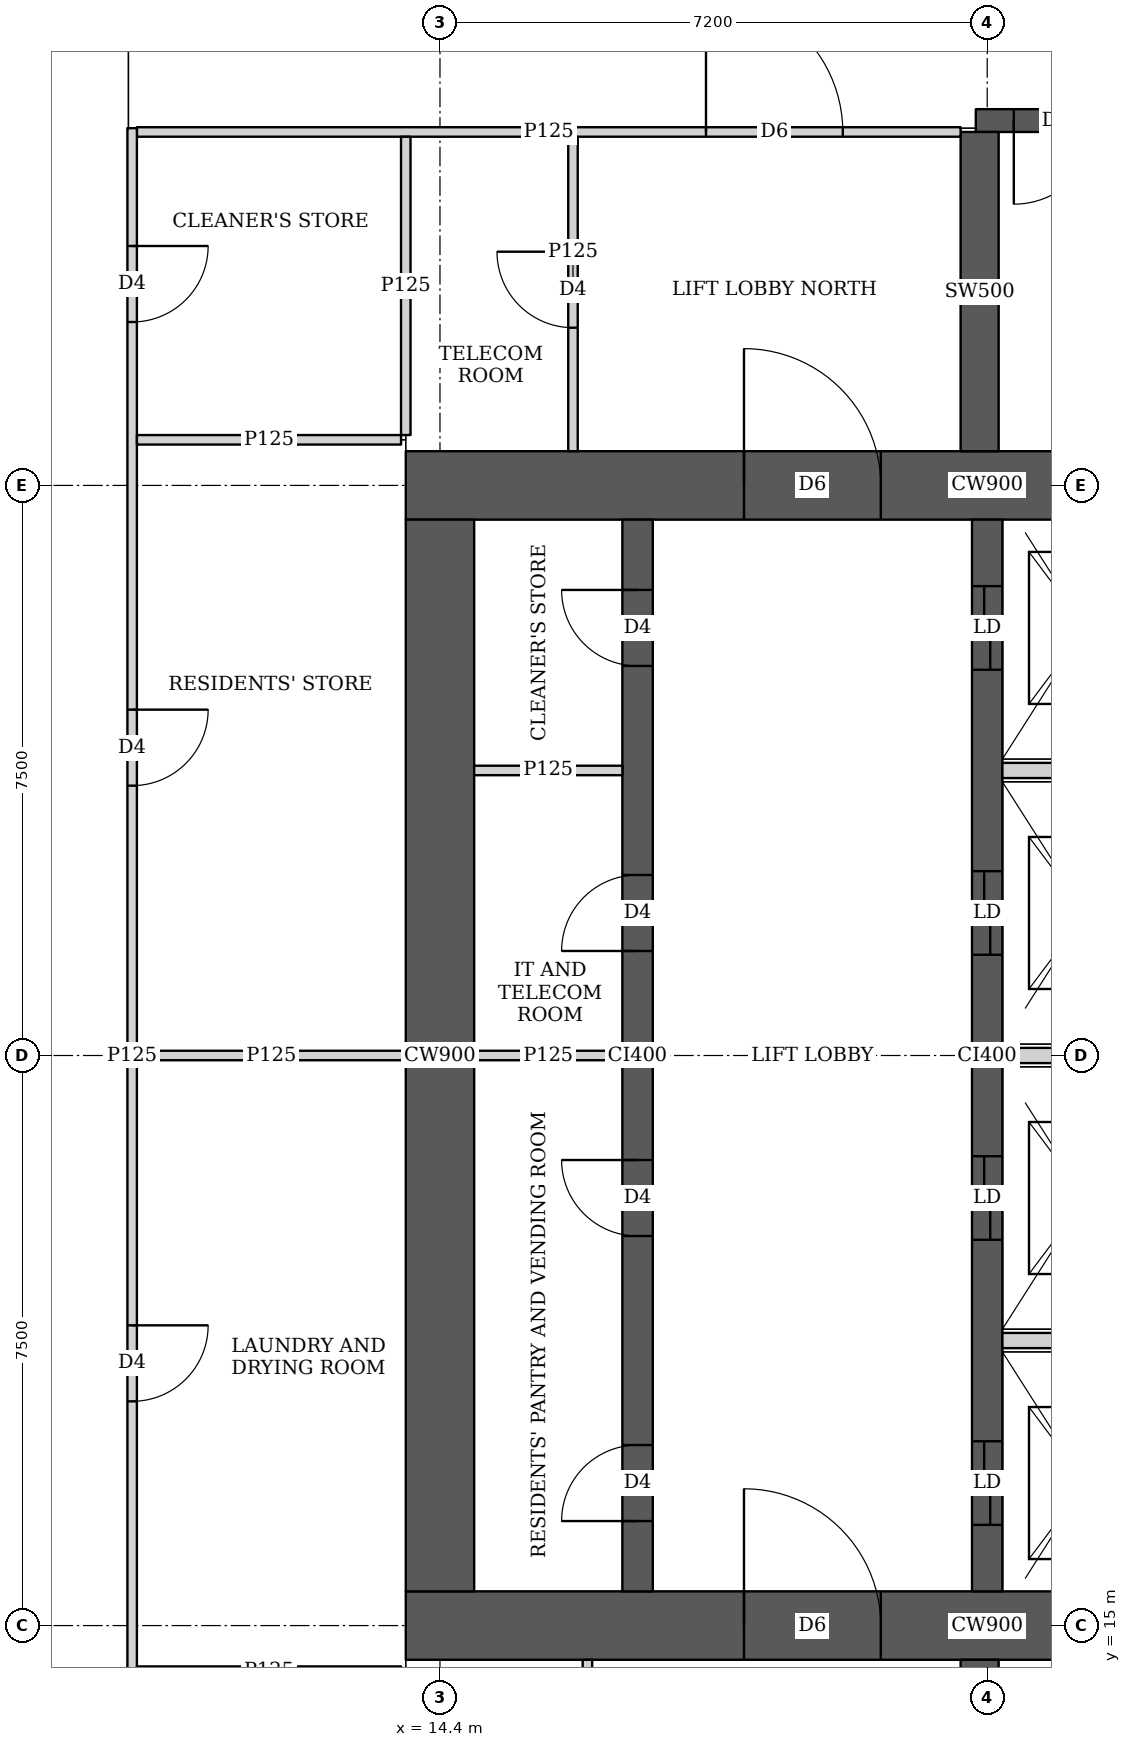
"""IFC4 building model, lengths in metres.
Left out: names, types, materials, properties, quantities, classifications, styles, units other than length and angle.
Written with IfcOpenShell. Run it as: python <this file> out.ifc"""

import sys

from ifc_helpers import new_model, si_unit, direction, frame, frame_2d, origin, place, context, subcontext, project, spatial, rectangle, extrude, element, fill, save


model = new_model("IFC4")
c1 = context("Model", 3, precision=1e-05, world=origin(), true_north=direction((0.0, 1.0)))
c2 = subcontext(c1, "Body", "Model", "MODEL_VIEW")
j1 = project(units=[si_unit("LENGTHUNIT", "METRE"), si_unit("PLANEANGLEUNIT", "RADIAN")], contexts=[c1])
p1 = place(None, origin())
s1 = spatial("IfcSite", under=j1, at=p1, CompositionType="ELEMENT")
p2 = place(p1, origin())
s2 = spatial("IfcBuilding", under=s1, at=p2, CompositionType="ELEMENT")
p3 = place(p2, frame((0.0, 0.0, 180.8)))
s3 = spatial("IfcBuildingStorey", under=s2, at=p3, CompositionType="ELEMENT", Elevation=180.8)
p4 = place(p3, frame((13.95, 15.0, 0.0), z_axis=(0.0, 0.0, 1.0), x_axis=(1.0, 0.0, 0.0)))
e1 = element("IfcWall", 1, at=p4, inside=s3, PredefinedType="SHEAR", context=c2, shape_type="SweptSolid", body=[
    extrude(rectangle(XDim=15.3, YDim=0.9, at=frame_2d((7.65, 0.0))), origin(), (0.0, 0.0, 1.0), 3.75),
])
p5 = place(p4, frame((4.45, 0.0, 0.0)))
e2 = element("IfcOpeningElement", 2, at=p5, cuts=e1, PredefinedType="OPENING", context=c2, shape_type="SweptSolid", body=[
    extrude(rectangle(XDim=1.8, YDim=2.1, at=frame_2d((0.9, 1.05))), frame((0.0, 0.46, 0.0), z_axis=(0.0, -1.0, 0.0), x_axis=(1.0, 0.0, 0.0)), (0.0, 0.0, 1.0), 0.92),
])
p6 = place(p4, frame((10.7, 0.0, 0.0)))
e3 = element("IfcOpeningElement", 3, at=p6, cuts=e1, PredefinedType="OPENING", context=c2, shape_type="SweptSolid", body=[
    extrude(rectangle(XDim=1.1, YDim=2.1, at=frame_2d((0.55, 1.05))), frame((0.0, 0.46, 0.0), z_axis=(0.0, -1.0, 0.0), x_axis=(1.0, 0.0, 0.0)), (0.0, 0.0, 1.0), 0.92),
])
p7 = place(p3, frame((13.95, 30.0, 0.0), z_axis=(0.0, 0.0, 1.0), x_axis=(1.0, 0.0, 0.0)))
e4 = element("IfcWall", 4, at=p7, inside=s3, PredefinedType="SHEAR", context=c2, shape_type="SweptSolid", body=[
    extrude(rectangle(XDim=15.3, YDim=0.9, at=frame_2d((7.65, 0.0))), origin(), (0.0, 0.0, 1.0), 3.75),
])
p8 = place(p7, frame((4.45, 0.0, 0.0)))
e5 = element("IfcOpeningElement", 5, at=p8, cuts=e4, PredefinedType="OPENING", context=c2, shape_type="SweptSolid", body=[
    extrude(rectangle(XDim=1.8, YDim=2.1, at=frame_2d((0.9, 1.05))), frame((0.0, 0.46, 0.0), z_axis=(0.0, -1.0, 0.0), x_axis=(1.0, 0.0, 0.0)), (0.0, 0.0, 1.0), 0.92),
])
p9 = place(p7, frame((10.7, 0.0, 0.0)))
e6 = element("IfcOpeningElement", 6, at=p9, cuts=e4, PredefinedType="OPENING", context=c2, shape_type="SweptSolid", body=[
    extrude(rectangle(XDim=1.1, YDim=2.1, at=frame_2d((0.55, 1.05))), frame((0.0, 0.46, 0.0), z_axis=(0.0, -1.0, 0.0), x_axis=(1.0, 0.0, 0.0)), (0.0, 0.0, 1.0), 0.92),
])
p10 = place(p3, frame((14.4, 15.45, 0.0), z_axis=(0.0, 0.0, 1.0), x_axis=(0.0, 1.0, 0.0)))
e7 = element("IfcWall", 7, at=p10, inside=s3, PredefinedType="SHEAR", context=c2, shape_type="SweptSolid", body=[
    extrude(rectangle(XDim=14.1, YDim=0.9, at=frame_2d((7.05, 0.0))), origin(), (0.0, 0.0, 1.0), 3.75),
])
p11 = place(p3, frame((17.0, 15.45, 0.0), z_axis=(0.0, 0.0, 1.0), x_axis=(0.0, 1.0, 0.0)))
e8 = element("IfcWall", 8, at=p11, inside=s3, PredefinedType="SHEAR", context=c2, shape_type="SweptSolid", body=[
    extrude(rectangle(XDim=14.1, YDim=0.4, at=frame_2d((7.05, 0.0))), origin(), (0.0, 0.0, 1.0), 3.75),
])
p12 = place(p11, frame((0.925, 0.0, 0.0)))
e9 = element("IfcOpeningElement", 9, at=p12, cuts=e8, PredefinedType="OPENING", context=c2, shape_type="SweptSolid", body=[
    extrude(rectangle(XDim=1.0, YDim=2.1, at=frame_2d((0.5, 1.05))), frame((0.0, 0.21, 0.0), z_axis=(0.0, -1.0, 0.0), x_axis=(1.0, 0.0, 0.0)), (0.0, 0.0, 1.0), 0.42),
])
p13 = place(p11, frame((4.675, 0.0, 0.0)))
e10 = element("IfcOpeningElement", 10, at=p13, cuts=e8, PredefinedType="OPENING", context=c2, shape_type="SweptSolid", body=[
    extrude(rectangle(XDim=1.0, YDim=2.1, at=frame_2d((0.5, 1.05))), frame((0.0, 0.21, 0.0), z_axis=(0.0, -1.0, 0.0), x_axis=(1.0, 0.0, 0.0)), (0.0, 0.0, 1.0), 0.42),
])
p14 = place(p11, frame((8.425, 0.0, 0.0)))
e11 = element("IfcOpeningElement", 11, at=p14, cuts=e8, PredefinedType="OPENING", context=c2, shape_type="SweptSolid", body=[
    extrude(rectangle(XDim=1.0, YDim=2.1, at=frame_2d((0.5, 1.05))), frame((0.0, 0.21, 0.0), z_axis=(0.0, -1.0, 0.0), x_axis=(1.0, 0.0, 0.0)), (0.0, 0.0, 1.0), 0.42),
])
p15 = place(p11, frame((12.175, 0.0, 0.0)))
e12 = element("IfcOpeningElement", 12, at=p15, cuts=e8, PredefinedType="OPENING", context=c2, shape_type="SweptSolid", body=[
    extrude(rectangle(XDim=1.0, YDim=2.1, at=frame_2d((0.5, 1.05))), frame((0.0, 0.21, 0.0), z_axis=(0.0, -1.0, 0.0), x_axis=(1.0, 0.0, 0.0)), (0.0, 0.0, 1.0), 0.42),
])
p16 = place(p3, frame((21.6, 15.45, 0.0), z_axis=(0.0, 0.0, 1.0), x_axis=(0.0, 1.0, 0.0)))
e13 = element("IfcWall", 13, at=p16, inside=s3, PredefinedType="SHEAR", context=c2, shape_type="SweptSolid", body=[
    extrude(rectangle(XDim=14.1, YDim=0.4, at=frame_2d((7.05, 0.0))), origin(), (0.0, 0.0, 1.0), 3.75),
])
p17 = place(p16, frame((0.875, 0.0, 0.0)))
e14 = element("IfcOpeningElement", 14, at=p17, cuts=e13, PredefinedType="OPENING", context=c2, shape_type="SweptSolid", body=[
    extrude(rectangle(XDim=1.1, YDim=2.1, at=frame_2d((0.55, 1.05))), frame((0.0, 0.21, 0.0), z_axis=(0.0, -1.0, 0.0), x_axis=(1.0, 0.0, 0.0)), (0.0, 0.0, 1.0), 0.42),
])
p18 = place(p16, frame((4.625, 0.0, 0.0)))
e15 = element("IfcOpeningElement", 15, at=p18, cuts=e13, PredefinedType="OPENING", context=c2, shape_type="SweptSolid", body=[
    extrude(rectangle(XDim=1.1, YDim=2.1, at=frame_2d((0.55, 1.05))), frame((0.0, 0.21, 0.0), z_axis=(0.0, -1.0, 0.0), x_axis=(1.0, 0.0, 0.0)), (0.0, 0.0, 1.0), 0.42),
])
p19 = place(p16, frame((8.375, 0.0, 0.0)))
e16 = element("IfcOpeningElement", 16, at=p19, cuts=e13, PredefinedType="OPENING", context=c2, shape_type="SweptSolid", body=[
    extrude(rectangle(XDim=1.1, YDim=2.1, at=frame_2d((0.55, 1.05))), frame((0.0, 0.21, 0.0), z_axis=(0.0, -1.0, 0.0), x_axis=(1.0, 0.0, 0.0)), (0.0, 0.0, 1.0), 0.42),
])
p20 = place(p16, frame((12.125, 0.0, 0.0)))
e17 = element("IfcOpeningElement", 17, at=p20, cuts=e13, PredefinedType="OPENING", context=c2, shape_type="SweptSolid", body=[
    extrude(rectangle(XDim=1.1, YDim=2.1, at=frame_2d((0.55, 1.05))), frame((0.0, 0.21, 0.0), z_axis=(0.0, -1.0, 0.0), x_axis=(1.0, 0.0, 0.0)), (0.0, 0.0, 1.0), 0.42),
])
p21 = place(p3, frame((21.5, 10.35, 0.0), z_axis=(0.0, 0.0, 1.0), x_axis=(0.0, 1.0, 0.0)))
e18 = element("IfcWall", 18, at=p21, inside=s3, PredefinedType="SHEAR", context=c2, shape_type="SweptSolid", body=[
    extrude(rectangle(XDim=4.2, YDim=0.5, at=frame_2d((2.1, 0.0))), origin(), (0.0, 0.0, 1.0), 3.75),
])
p22 = place(p3, frame((21.45, 34.8, 0.0), z_axis=(0.0, 0.0, 1.0), x_axis=(1.0, 0.0, 0.0)))
e19 = element("IfcWall", 19, at=p22, inside=s3, PredefinedType="SHEAR", context=c2, shape_type="SweptSolid", body=[
    extrude(rectangle(XDim=7.5, YDim=0.3, at=frame_2d((3.75, 0.0))), origin(), (0.0, 0.0, 1.0), 3.75),
])
p23 = place(p22, frame((0.5, 0.0, 0.0)))
e20 = element("IfcOpeningElement", 20, at=p23, cuts=e19, PredefinedType="OPENING", context=c2, shape_type="SweptSolid", body=[
    extrude(rectangle(XDim=1.1, YDim=2.1, at=frame_2d((0.55, 1.05))), frame((0.0, 0.16, 0.0), z_axis=(0.0, -1.0, 0.0), x_axis=(1.0, 0.0, 0.0)), (0.0, 0.0, 1.0), 0.32),
])
p24 = place(p3, frame((21.5, 30.45, 0.0), z_axis=(0.0, 0.0, 1.0), x_axis=(0.0, 1.0, 0.0)))
e21 = element("IfcWall", 21, at=p24, inside=s3, PredefinedType="SHEAR", context=c2, shape_type="SweptSolid", body=[
    extrude(rectangle(XDim=4.2, YDim=0.5, at=frame_2d((2.1, 0.0))), origin(), (0.0, 0.0, 1.0), 3.75),
])
p25 = place(p3, frame((10.35, 10.3, 0.0), z_axis=(0.0, 0.0, 1.0), x_axis=(0.0, 1.0, 0.0)))
e22 = element("IfcWall", 22, at=p25, inside=s3, PredefinedType="PARTITIONING", context=c2, shape_type="SweptSolid", body=[
    extrude(rectangle(XDim=24.4, YDim=0.125, at=frame_2d((12.2, 0.0))), origin(), (0.0, 0.0, 1.0), 3.5),
])
p26 = place(p25, frame((1.55, 0.0, 0.0)))
e23 = element("IfcOpeningElement", 23, at=p26, cuts=e22, PredefinedType="OPENING", context=c2, shape_type="SweptSolid", body=[
    extrude(rectangle(XDim=1.0, YDim=2.1, at=frame_2d((0.5, 1.05))), frame((0.0, 0.073, 0.0), z_axis=(0.0, -1.0, 0.0), x_axis=(1.0, 0.0, 0.0)), (0.0, 0.0, 1.0), 0.145),
])
p27 = place(p25, frame((7.65, 0.0, 0.0)))
e24 = element("IfcOpeningElement", 24, at=p27, cuts=e22, PredefinedType="OPENING", context=c2, shape_type="SweptSolid", body=[
    extrude(rectangle(XDim=1.0, YDim=2.1, at=frame_2d((0.5, 1.05))), frame((0.0, 0.073, 0.0), z_axis=(0.0, -1.0, 0.0), x_axis=(1.0, 0.0, 0.0)), (0.0, 0.0, 1.0), 0.145),
])
p28 = place(p25, frame((15.75, 0.0, 0.0)))
e25 = element("IfcOpeningElement", 25, at=p28, cuts=e22, PredefinedType="OPENING", context=c2, shape_type="SweptSolid", body=[
    extrude(rectangle(XDim=1.0, YDim=2.1, at=frame_2d((0.5, 1.05))), frame((0.0, 0.073, 0.0), z_axis=(0.0, -1.0, 0.0), x_axis=(1.0, 0.0, 0.0)), (0.0, 0.0, 1.0), 0.145),
])
p29 = place(p25, frame((21.85, 0.0, 0.0)))
e26 = element("IfcOpeningElement", 26, at=p29, cuts=e22, PredefinedType="OPENING", context=c2, shape_type="SweptSolid", body=[
    extrude(rectangle(XDim=1.0, YDim=2.1, at=frame_2d((0.5, 1.05))), frame((0.0, 0.073, 0.0), z_axis=(0.0, -1.0, 0.0), x_axis=(1.0, 0.0, 0.0)), (0.0, 0.0, 1.0), 0.145),
])
p30 = place(p3, frame((10.413, 14.4, 0.0), z_axis=(0.0, 0.0, 1.0), x_axis=(1.0, 0.0, 0.0)))
e27 = element("IfcWall", 27, at=p30, inside=s3, PredefinedType="PARTITIONING", context=c2, shape_type="SweptSolid", body=[
    extrude(rectangle(XDim=3.475, YDim=0.125, at=frame_2d((1.737, 0.0))), origin(), (0.0, 0.0, 1.0), 3.5),
])
p31 = place(p3, frame((10.413, 22.5, 0.0), z_axis=(0.0, 0.0, 1.0), x_axis=(1.0, 0.0, 0.0)))
e28 = element("IfcWall", 28, at=p31, inside=s3, PredefinedType="PARTITIONING", context=c2, shape_type="SweptSolid", body=[
    extrude(rectangle(XDim=3.537, YDim=0.125, at=frame_2d((1.769, 0.0))), origin(), (0.0, 0.0, 1.0), 3.5),
])
p32 = place(p3, frame((10.413, 30.6, 0.0), z_axis=(0.0, 0.0, 1.0), x_axis=(1.0, 0.0, 0.0)))
e29 = element("IfcWall", 29, at=p32, inside=s3, PredefinedType="PARTITIONING", context=c2, shape_type="SweptSolid", body=[
    extrude(rectangle(XDim=3.475, YDim=0.125, at=frame_2d((1.737, 0.0))), origin(), (0.0, 0.0, 1.0), 3.5),
])
p33 = place(p3, frame((13.95, 30.663, 0.0), z_axis=(0.0, 0.0, 1.0), x_axis=(0.0, 1.0, 0.0)))
e30 = element("IfcWall", 30, at=p33, inside=s3, PredefinedType="PARTITIONING", context=c2, shape_type="SweptSolid", body=[
    extrude(rectangle(XDim=3.924, YDim=0.125, at=frame_2d((1.962, 0.0))), origin(), (0.0, 0.0, 1.0), 3.5),
])
p34 = place(p3, frame((10.413, 34.65, 0.0), z_axis=(0.0, 0.0, 1.0), x_axis=(1.0, 0.0, 0.0)))
e31 = element("IfcWall", 31, at=p34, inside=s3, PredefinedType="PARTITIONING", context=c2, shape_type="SweptSolid", body=[
    extrude(rectangle(XDim=10.837, YDim=0.125, at=frame_2d((5.418, 0.0))), origin(), (0.0, 0.0, 1.0), 3.5),
])
p35 = place(p34, frame((7.487, 0.0, 0.0)))
e32 = element("IfcOpeningElement", 32, at=p35, cuts=e31, PredefinedType="OPENING", context=c2, shape_type="SweptSolid", body=[
    extrude(rectangle(XDim=1.8, YDim=2.1, at=frame_2d((0.9, 1.05))), frame((0.0, 0.073, 0.0), z_axis=(0.0, -1.0, 0.0), x_axis=(1.0, 0.0, 0.0)), (0.0, 0.0, 1.0), 0.145),
])
p36 = place(p3, frame((16.34, 10.413, 0.0), z_axis=(0.0, 0.0, 1.0), x_axis=(0.0, 1.0, 0.0)))
e33 = element("IfcWall", 33, at=p36, inside=s3, PredefinedType="PARTITIONING", context=c2, shape_type="SweptSolid", body=[
    extrude(rectangle(XDim=4.137, YDim=0.125, at=frame_2d((2.068, 0.0))), origin(), (0.0, 0.0, 1.0), 3.5),
])
p37 = place(p36, frame((1.512, 0.0, 0.0)))
e34 = element("IfcOpeningElement", 34, at=p37, cuts=e33, PredefinedType="OPENING", context=c2, shape_type="SweptSolid", body=[
    extrude(rectangle(XDim=1.0, YDim=2.1, at=frame_2d((0.5, 1.05))), frame((0.0, 0.073, 0.0), z_axis=(0.0, -1.0, 0.0), x_axis=(1.0, 0.0, 0.0)), (0.0, 0.0, 1.0), 0.145),
])
p38 = place(p3, frame((16.15, 30.45, 0.0), z_axis=(0.0, 0.0, 1.0), x_axis=(0.0, 1.0, 0.0)))
e35 = element("IfcWall", 35, at=p38, inside=s3, PredefinedType="PARTITIONING", context=c2, shape_type="SweptSolid", body=[
    extrude(rectangle(XDim=4.137, YDim=0.125, at=frame_2d((2.068, 0.0))), origin(), (0.0, 0.0, 1.0), 3.5),
])
p39 = place(p38, frame((1.625, 0.0, 0.0)))
e36 = element("IfcOpeningElement", 36, at=p39, cuts=e35, PredefinedType="OPENING", context=c2, shape_type="SweptSolid", body=[
    extrude(rectangle(XDim=1.0, YDim=2.1, at=frame_2d((0.5, 1.05))), frame((0.0, 0.073, 0.0), z_axis=(0.0, -1.0, 0.0), x_axis=(1.0, 0.0, 0.0)), (0.0, 0.0, 1.0), 0.145),
])
for number, where, z_axis, x_axis in (
    (37, (14.85, 22.5, 0.0), (0.0, 0.0, 1.0), (1.0, 0.0, 0.0)),
    (38, (14.85, 26.25, 0.0), (0.0, 0.0, 1.0), (1.0, 0.0, 0.0)),
):
    element("IfcWall", number, at=place(p3, frame(where, z_axis=z_axis, x_axis=x_axis)), inside=s3, PredefinedType="PARTITIONING", context=c2, shape_type="SweptSolid", body=[
        extrude(rectangle(XDim=1.95, YDim=0.125, at=frame_2d((0.975, 0.0))), origin(), (0.0, 0.0, 1.0), 3.5),
    ])
for number, where, z_axis, x_axis in (
    (39, (21.8, 18.75, 0.0), (0.0, 0.0, 1.0), (1.0, 0.0, 0.0)),
    (40, (21.8, 22.5, 0.0), (0.0, 0.0, 1.0), (1.0, 0.0, 0.0)),
    (41, (21.8, 26.25, 0.0), (0.0, 0.0, 1.0), (1.0, 0.0, 0.0)),
):
    element("IfcWall", number, at=place(p3, frame(where, z_axis=z_axis, x_axis=x_axis)), inside=s3, PredefinedType="SOLIDWALL", context=c2, shape_type="SweptSolid", body=[
        extrude(rectangle(XDim=2.2, YDim=0.2, at=frame_2d((1.1, 0.0))), origin(), (0.0, 0.0, 1.0), 3.5),
    ])
p40 = place(p27, origin())
e42 = element("IfcDoor", 42, at=p40, inside=s3, OperationType="SINGLE_SWING_LEFT", PredefinedType="DOOR", context=c2, shape_type="SweptSolid", body=[
    extrude(rectangle(XDim=1.0, YDim=2.1, at=frame_2d((0.5, 1.05))), frame((0.0, 0.025, 0.0), z_axis=(0.0, -1.0, 0.0), x_axis=(1.0, 0.0, 0.0)), (0.0, 0.0, 1.0), 0.05),
])
fill(e24, e42)
p41 = place(p28, origin())
e43 = element("IfcDoor", 43, at=p41, inside=s3, OperationType="SINGLE_SWING_LEFT", PredefinedType="DOOR", context=c2, shape_type="SweptSolid", body=[
    extrude(rectangle(XDim=1.0, YDim=2.1, at=frame_2d((0.5, 1.05))), frame((0.0, 0.025, 0.0), z_axis=(0.0, -1.0, 0.0), x_axis=(1.0, 0.0, 0.0)), (0.0, 0.0, 1.0), 0.05),
])
fill(e25, e43)
p42 = place(p29, origin())
e44 = element("IfcDoor", 44, at=p42, inside=s3, OperationType="SINGLE_SWING_LEFT", PredefinedType="DOOR", context=c2, shape_type="SweptSolid", body=[
    extrude(rectangle(XDim=1.0, YDim=2.1, at=frame_2d((0.5, 1.05))), frame((0.0, 0.025, 0.0), z_axis=(0.0, -1.0, 0.0), x_axis=(1.0, 0.0, 0.0)), (0.0, 0.0, 1.0), 0.05),
])
fill(e26, e44)
p43 = place(p39, origin())
e45 = element("IfcDoor", 45, at=p43, inside=s3, OperationType="SINGLE_SWING_RIGHT", PredefinedType="DOOR", context=c2, shape_type="SweptSolid", body=[
    extrude(rectangle(XDim=1.0, YDim=2.1, at=frame_2d((0.5, 1.05))), frame((0.0, 0.025, 0.0), z_axis=(0.0, -1.0, 0.0), x_axis=(1.0, 0.0, 0.0)), (0.0, 0.0, 1.0), 0.05),
])
fill(e36, e45)
p44 = place(p35, origin())
e46 = element("IfcDoor", 46, at=p44, inside=s3, OperationType="DOUBLE_DOOR_SINGLE_SWING", PredefinedType="DOOR", context=c2, shape_type="SweptSolid", body=[
    extrude(rectangle(XDim=1.8, YDim=2.1, at=frame_2d((0.9, 1.05))), frame((0.0, 0.025, 0.0), z_axis=(0.0, -1.0, 0.0), x_axis=(1.0, 0.0, 0.0)), (0.0, 0.0, 1.0), 0.05),
])
fill(e32, e46)
p45 = place(p12, origin())
e47 = element("IfcDoor", 47, at=p45, inside=s3, OperationType="SINGLE_SWING_LEFT", PredefinedType="DOOR", context=c2, shape_type="SweptSolid", body=[
    extrude(rectangle(XDim=1.0, YDim=2.1, at=frame_2d((0.5, 1.05))), frame((0.0, 0.025, 0.0), z_axis=(0.0, -1.0, 0.0), x_axis=(1.0, 0.0, 0.0)), (0.0, 0.0, 1.0), 0.05),
])
fill(e9, e47)
p46 = place(p13, origin())
e48 = element("IfcDoor", 48, at=p46, inside=s3, OperationType="SINGLE_SWING_RIGHT", PredefinedType="DOOR", context=c2, shape_type="SweptSolid", body=[
    extrude(rectangle(XDim=1.0, YDim=2.1, at=frame_2d((0.5, 1.05))), frame((0.0, 0.025, 0.0), z_axis=(0.0, -1.0, 0.0), x_axis=(1.0, 0.0, 0.0)), (0.0, 0.0, 1.0), 0.05),
])
fill(e10, e48)
p47 = place(p14, origin())
e49 = element("IfcDoor", 49, at=p47, inside=s3, OperationType="SINGLE_SWING_LEFT", PredefinedType="DOOR", context=c2, shape_type="SweptSolid", body=[
    extrude(rectangle(XDim=1.0, YDim=2.1, at=frame_2d((0.5, 1.05))), frame((0.0, 0.025, 0.0), z_axis=(0.0, -1.0, 0.0), x_axis=(1.0, 0.0, 0.0)), (0.0, 0.0, 1.0), 0.05),
])
fill(e11, e49)
p48 = place(p15, origin())
e50 = element("IfcDoor", 50, at=p48, inside=s3, OperationType="SINGLE_SWING_RIGHT", PredefinedType="DOOR", context=c2, shape_type="SweptSolid", body=[
    extrude(rectangle(XDim=1.0, YDim=2.1, at=frame_2d((0.5, 1.05))), frame((0.0, 0.025, 0.0), z_axis=(0.0, -1.0, 0.0), x_axis=(1.0, 0.0, 0.0)), (0.0, 0.0, 1.0), 0.05),
])
fill(e12, e50)
p49 = place(p5, origin())
e51 = element("IfcDoor", 51, at=p49, inside=s3, OperationType="DOUBLE_DOOR_SINGLE_SWING", PredefinedType="DOOR", context=c2, shape_type="SweptSolid", body=[
    extrude(rectangle(XDim=1.8, YDim=2.1, at=frame_2d((0.9, 1.05))), frame((0.0, 0.025, 0.0), z_axis=(0.0, -1.0, 0.0), x_axis=(1.0, 0.0, 0.0)), (0.0, 0.0, 1.0), 0.05),
])
fill(e2, e51)
p50 = place(p8, origin())
e52 = element("IfcDoor", 52, at=p50, inside=s3, OperationType="DOUBLE_DOOR_SINGLE_SWING", PredefinedType="DOOR", context=c2, shape_type="SweptSolid", body=[
    extrude(rectangle(XDim=1.8, YDim=2.1, at=frame_2d((0.9, 1.05))), frame((0.0, 0.025, 0.0), z_axis=(0.0, -1.0, 0.0), x_axis=(1.0, 0.0, 0.0)), (0.0, 0.0, 1.0), 0.05),
])
fill(e5, e52)
p51 = place(p17, origin())
e53 = element("IfcDoor", 53, at=p51, inside=s3, OperationType="DOUBLE_DOOR_SLIDING", PredefinedType="DOOR", context=c2, shape_type="SweptSolid", body=[
    extrude(rectangle(XDim=1.1, YDim=2.1, at=frame_2d((0.55, 1.05))), frame((0.0, 0.025, 0.0), z_axis=(0.0, -1.0, 0.0), x_axis=(1.0, 0.0, 0.0)), (0.0, 0.0, 1.0), 0.05),
])
fill(e14, e53)
p52 = place(p18, origin())
e54 = element("IfcDoor", 54, at=p52, inside=s3, OperationType="DOUBLE_DOOR_SLIDING", PredefinedType="DOOR", context=c2, shape_type="SweptSolid", body=[
    extrude(rectangle(XDim=1.1, YDim=2.1, at=frame_2d((0.55, 1.05))), frame((0.0, 0.025, 0.0), z_axis=(0.0, -1.0, 0.0), x_axis=(1.0, 0.0, 0.0)), (0.0, 0.0, 1.0), 0.05),
])
fill(e15, e54)
p53 = place(p19, origin())
e55 = element("IfcDoor", 55, at=p53, inside=s3, OperationType="DOUBLE_DOOR_SLIDING", PredefinedType="DOOR", context=c2, shape_type="SweptSolid", body=[
    extrude(rectangle(XDim=1.1, YDim=2.1, at=frame_2d((0.55, 1.05))), frame((0.0, 0.025, 0.0), z_axis=(0.0, -1.0, 0.0), x_axis=(1.0, 0.0, 0.0)), (0.0, 0.0, 1.0), 0.05),
])
fill(e16, e55)
p54 = place(p20, origin())
e56 = element("IfcDoor", 56, at=p54, inside=s3, OperationType="DOUBLE_DOOR_SLIDING", PredefinedType="DOOR", context=c2, shape_type="SweptSolid", body=[
    extrude(rectangle(XDim=1.1, YDim=2.1, at=frame_2d((0.55, 1.05))), frame((0.0, 0.025, 0.0), z_axis=(0.0, -1.0, 0.0), x_axis=(1.0, 0.0, 0.0)), (0.0, 0.0, 1.0), 0.05),
])
fill(e17, e56)
p55 = place(p23, origin())
e57 = element("IfcDoor", 57, at=p55, inside=s3, OperationType="SINGLE_SWING_RIGHT", PredefinedType="DOOR", context=c2, shape_type="SweptSolid", body=[
    extrude(rectangle(XDim=1.1, YDim=2.1, at=frame_2d((0.55, 1.05))), frame((0.0, 0.025, 0.0), z_axis=(0.0, -1.0, 0.0), x_axis=(1.0, 0.0, 0.0)), (0.0, 0.0, 1.0), 0.05),
])
fill(e20, e57)
save(model, sys.argv[1])
